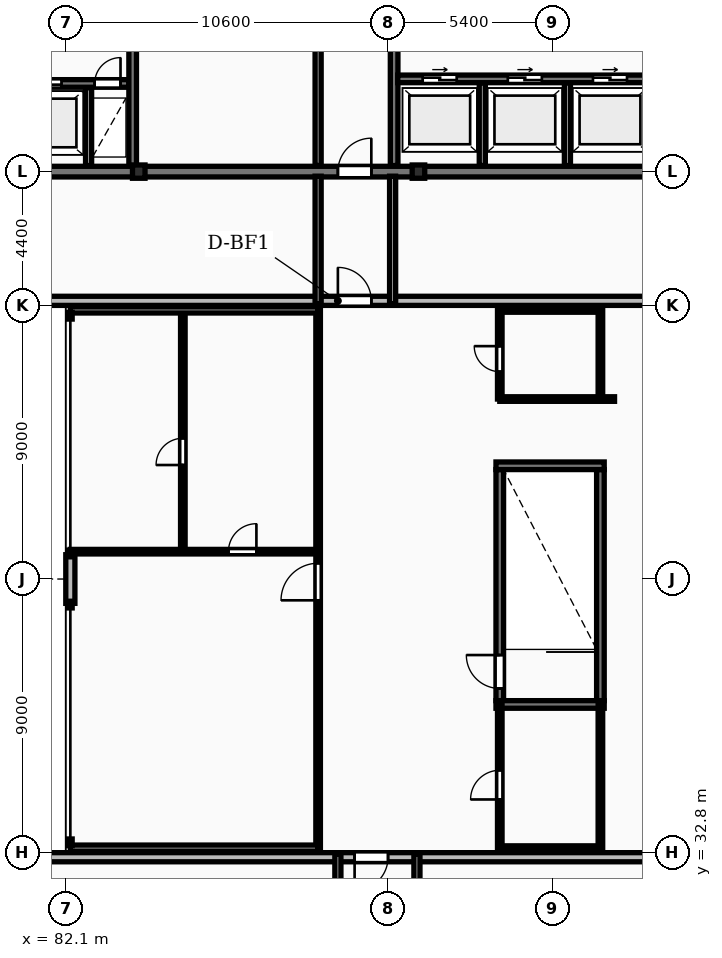
"""IFC4 building model, lengths in metres.
Left out: names, types, materials, properties, quantities, classifications, styles, units other than length and angle.
Written with IfcOpenShell. Run it as: python <this file> out.ifc"""

import sys

from ifc_helpers import new_model, si_unit, direction, frame, frame_2d, origin, origin_2d, place, context, subcontext, project, spatial, rectangle, i_section, extrude, element, fill, save


model = new_model("IFC4")
c1 = context("Model", 3, precision=1e-05, world=origin(), true_north=direction((0.0, 1.0)))
c2 = subcontext(c1, "Body", "Model", "MODEL_VIEW")
j1 = project(units=[si_unit("LENGTHUNIT", "METRE"), si_unit("PLANEANGLEUNIT", "RADIAN")], contexts=[c1])
p1 = place(None, origin())
s1 = spatial("IfcSite", under=j1, at=p1, CompositionType="ELEMENT")
p2 = place(p1, origin())
s2 = spatial("IfcBuilding", under=s1, at=p2, CompositionType="ELEMENT")
p3 = place(p2, frame((0.0, 0.0, 153.7)))
s3 = spatial("IfcBuildingStorey", under=s2, at=p3, CompositionType="ELEMENT", Elevation=153.7)
for number, where, z_axis, x_axis in (
    (1, (84.5, 55.2, 0.0), (0.0, 0.0, 1.0), (1.0, 0.0, 0.0)),
    (2, (93.7, 55.2, 0.0), (0.0, 0.0, 1.0), (1.0, 0.0, 0.0)),
):
    element("IfcColumn", number, at=place(p3, frame(where, z_axis=z_axis, x_axis=x_axis)), inside=s3, PredefinedType="COLUMN", context=c2, shape_type="SweptSolid", body=[
        extrude(i_section(OverallWidth=0.412, OverallDepth=0.437, WebThickness=0.036, FlangeThickness=0.052, FilletRadius=0.015, at=origin_2d()), origin(), (0.0, 0.0, 1.0), 3.6),
    ])
p4 = place(p3, frame((57.6, 50.95, 0.0), z_axis=(0.0, 0.0, 1.0), x_axis=(1.0, 0.0, 0.0)))
e3 = element("IfcWall", 3, at=p4, inside=s3, PredefinedType="STANDARD", context=c2, shape_type="SweptSolid", body=[
    extrude(rectangle(XDim=73.0, YDim=0.3, at=frame_2d((36.5, 0.0))), origin(), (0.0, 0.0, 1.0), 3.32),
])
p5 = place(p4, frame((15.225, 0.0, 0.85)))
e4 = element("IfcOpeningElement", 4, at=p5, cuts=e3, PredefinedType="OPENING", context=c2, shape_type="SweptSolid", body=[
    extrude(rectangle(XDim=1.8, YDim=1.8, at=frame_2d((0.9, 0.9))), frame((0.0, 0.16, 0.0), z_axis=(0.0, -1.0, 0.0), x_axis=(1.0, 0.0, 0.0)), (0.0, 0.0, 1.0), 0.32),
])
p6 = place(p4, frame((58.575, 0.0, 0.85)))
e5 = element("IfcOpeningElement", 5, at=p6, cuts=e3, PredefinedType="OPENING", context=c2, shape_type="SweptSolid", body=[
    extrude(rectangle(XDim=1.8, YDim=1.8, at=frame_2d((0.9, 0.9))), frame((0.0, 0.16, 0.0), z_axis=(0.0, -1.0, 0.0), x_axis=(1.0, 0.0, 0.0)), (0.0, 0.0, 1.0), 0.32),
])
p7 = place(p4, frame((33.45, 0.0, 0.0)))
e6 = element("IfcOpeningElement", 6, at=p7, cuts=e3, PredefinedType="OPENING", context=c2, shape_type="SweptSolid", body=[
    extrude(rectangle(XDim=1.1, YDim=2.1, at=frame_2d((0.55, 1.05))), frame((0.0, 0.16, 0.0), z_axis=(0.0, -1.0, 0.0), x_axis=(1.0, 0.0, 0.0)), (0.0, 0.0, 1.0), 0.32),
])
p8 = place(p3, frame((130.7, 32.65, 0.0), z_axis=(0.0, 0.0, 1.0), x_axis=(-1.0, 0.0, 0.0)))
e7 = element("IfcWall", 7, at=p8, inside=s3, PredefinedType="STANDARD", context=c2, shape_type="SweptSolid", body=[
    extrude(rectangle(XDim=58.0, YDim=0.3, at=frame_2d((29.0, 0.0))), origin(), (0.0, 0.0, 1.0), 3.32),
])
p9 = place(p8, frame((50.125, 0.0, 0.85)))
e8 = element("IfcOpeningElement", 8, at=p9, cuts=e7, PredefinedType="OPENING", context=c2, shape_type="SweptSolid", body=[
    extrude(rectangle(XDim=1.8, YDim=1.8, at=frame_2d((0.9, 0.9))), frame((0.0, 0.16, 0.0), z_axis=(0.0, -1.0, 0.0), x_axis=(1.0, 0.0, 0.0)), (0.0, 0.0, 1.0), 0.32),
])
p10 = place(p8, frame((6.775, 0.0, 0.85)))
e9 = element("IfcOpeningElement", 9, at=p10, cuts=e7, PredefinedType="OPENING", context=c2, shape_type="SweptSolid", body=[
    extrude(rectangle(XDim=1.8, YDim=1.8, at=frame_2d((0.9, 0.9))), frame((0.0, 0.16, 0.0), z_axis=(0.0, -1.0, 0.0), x_axis=(1.0, 0.0, 0.0)), (0.0, 0.0, 1.0), 0.32),
])
p11 = place(p8, frame((38.0, 0.0, 0.0)))
e10 = element("IfcOpeningElement", 10, at=p11, cuts=e7, PredefinedType="OPENING", context=c2, shape_type="SweptSolid", body=[
    extrude(rectangle(XDim=1.1, YDim=2.1, at=frame_2d((0.55, 1.05))), frame((0.0, 0.16, 0.0), z_axis=(0.0, -1.0, 0.0), x_axis=(1.0, 0.0, 0.0)), (0.0, 0.0, 1.0), 0.32),
])
p12 = place(p3, frame((82.25, 41.0, 0.0), z_axis=(0.0, 0.0, 1.0), x_axis=(0.0, 1.0, 0.0)))
e11 = element("IfcWall", 11, at=p12, inside=s3, PredefinedType="STANDARD", context=c2, shape_type="SweptSolid", body=[
    extrude(rectangle(XDim=1.6, YDim=0.3, at=frame_2d((0.8, 0.0))), origin(), (0.0, 0.0, 1.0), 2.39),
])
p13 = place(p3, frame((75.95, 55.2, 0.0), z_axis=(0.0, 0.0, 1.0), x_axis=(1.0, 0.0, 0.0)))
e12 = element("IfcWall", 12, at=p13, inside=s3, PredefinedType="SHEAR", context=c2, shape_type="SweptSolid", body=[
    extrude(rectangle(XDim=36.3, YDim=0.35, at=frame_2d((18.15, 0.0))), origin(), (0.0, 0.0, 1.0), 3.6),
])
p14 = place(p13, frame((15.1, 0.0, 0.0)))
e13 = element("IfcOpeningElement", 13, at=p14, cuts=e12, PredefinedType="OPENING", context=c2, shape_type="SweptSolid", body=[
    extrude(rectangle(XDim=1.1, YDim=2.1, at=frame_2d((0.55, 1.05))), frame((0.0, 0.185, 0.0), z_axis=(0.0, -1.0, 0.0), x_axis=(1.0, 0.0, 0.0)), (0.0, 0.0, 1.0), 0.37),
])
p15 = place(p3, frame((79.79, 58.1, 0.0), z_axis=(0.0, 0.0, 1.0), x_axis=(1.0, 0.0, 0.0)))
e14 = element("IfcWall", 14, at=p15, inside=s3, PredefinedType="SHEAR", context=c2, shape_type="SweptSolid", body=[
    extrude(rectangle(XDim=4.39, YDim=0.25, at=frame_2d((2.195, 0.0))), origin(), (0.0, 0.0, 1.0), 3.6),
])
p16 = place(p15, frame((1.05, 0.0, 0.0)))
e15 = element("IfcOpeningElement", 15, at=p16, cuts=e14, PredefinedType="OPENING", context=c2, shape_type="SweptSolid", body=[
    extrude(rectangle(XDim=1.12, YDim=2.12, at=frame_2d((0.56, 1.06))), frame((0.0, 0.135, 0.0), z_axis=(0.0, -1.0, 0.0), x_axis=(1.0, 0.0, 0.0)), (0.0, 0.0, 1.0), 0.27),
])
p17 = place(p15, frame((3.26, 0.0, 0.0)))
e16 = element("IfcOpeningElement", 16, at=p17, cuts=e14, PredefinedType="OPENING", context=c2, shape_type="SweptSolid", body=[
    extrude(rectangle(XDim=0.85, YDim=2.05, at=frame_2d((0.425, 1.025))), frame((0.0, 0.135, 0.0), z_axis=(0.0, -1.0, 0.0), x_axis=(1.0, 0.0, 0.0)), (0.0, 0.0, 1.0), 0.27),
])
p18 = place(p3, frame((82.85, 55.4, 0.0), z_axis=(0.0, 0.0, 1.0), x_axis=(0.0, 1.0, 0.0)))
e17 = element("IfcWall", 17, at=p18, inside=s3, PredefinedType="PARTITIONING", context=c2, shape_type="SweptSolid", body=[
    extrude(rectangle(XDim=2.56, YDim=0.2, at=frame_2d((1.28, 0.0))), origin(), (0.0, 0.0, 1.0), 3.32),
])
p19 = place(p3, frame((84.3, 55.4, 0.0), z_axis=(0.0, 0.0, 1.0), x_axis=(0.0, 1.0, 0.0)))
e18 = element("IfcWall", 18, at=p19, inside=s3, PredefinedType="SHEAR", context=c2, shape_type="SweptSolid", body=[
    extrude(rectangle(XDim=11.6, YDim=0.25, at=frame_2d((5.8, 0.0))), origin(), (0.0, 0.0, 1.0), 3.6),
])
p20 = place(p19, frame((5.2, 0.0, 0.0)))
e19 = element("IfcOpeningElement", 19, at=p20, cuts=e18, PredefinedType="OPENING", context=c2, shape_type="SweptSolid", body=[
    extrude(rectangle(XDim=1.1, YDim=2.1, at=frame_2d((0.55, 1.05))), frame((0.0, 0.135, 0.0), z_axis=(0.0, -1.0, 0.0), x_axis=(1.0, 0.0, 0.0)), (0.0, 0.0, 1.0), 0.27),
])
p21 = place(p3, frame((90.4, 55.4, 0.0), z_axis=(0.0, 0.0, 1.0), x_axis=(0.0, 1.0, 0.0)))
e20 = element("IfcWall", 20, at=p21, inside=s3, PredefinedType="PARTITIONING", context=c2, shape_type="SweptSolid", body=[
    extrude(rectangle(XDim=4.1, YDim=0.2, at=frame_2d((2.05, 0.0))), origin(), (0.0, 0.0, 1.0), 3.32),
])
p22 = place(p3, frame((92.9, 55.4, 0.0), z_axis=(0.0, 0.0, 1.0), x_axis=(0.0, 1.0, 0.0)))
e21 = element("IfcWall", 21, at=p22, inside=s3, PredefinedType="SHEAR", context=c2, shape_type="SweptSolid", body=[
    extrude(rectangle(XDim=4.1, YDim=0.25, at=frame_2d((2.05, 0.0))), origin(), (0.0, 0.0, 1.0), 3.6),
])
for number, where, z_axis, x_axis in (
    (22, (95.8, 55.4, 0.0), (0.0, 0.0, 1.0), (0.0, 1.0, 0.0)),
    (23, (98.6, 55.4, 0.0), (0.0, 0.0, 1.0), (0.0, 1.0, 0.0)),
):
    element("IfcWall", number, at=place(p3, frame(where, z_axis=z_axis, x_axis=x_axis)), inside=s3, PredefinedType="PARTITIONING", context=c2, shape_type="SweptSolid", body=[
        extrude(rectangle(XDim=2.72, YDim=0.2, at=frame_2d((1.36, 0.0))), origin(), (0.0, 0.0, 1.0), 3.32),
    ])
p23 = place(p3, frame((93.02, 58.25, 0.0), z_axis=(0.0, 0.0, 1.0), x_axis=(1.0, 0.0, 0.0)))
e24 = element("IfcWall", 24, at=p23, inside=s3, PredefinedType="SHEAR", context=c2, shape_type="SweptSolid", body=[
    extrude(rectangle(XDim=8.36, YDim=0.25, at=frame_2d((4.18, 0.0))), origin(), (0.0, 0.0, 1.0), 3.6),
])
p24 = place(p23, frame((0.82, 0.0, 0.0)))
e25 = element("IfcOpeningElement", 25, at=p24, cuts=e24, PredefinedType="OPENING", context=c2, shape_type="SweptSolid", body=[
    extrude(rectangle(XDim=1.12, YDim=2.12, at=frame_2d((0.56, 1.06))), frame((0.0, 0.135, 0.0), z_axis=(0.0, -1.0, 0.0), x_axis=(1.0, 0.0, 0.0)), (0.0, 0.0, 1.0), 0.27),
])
p25 = place(p23, frame((3.62, 0.0, 0.0)))
e26 = element("IfcOpeningElement", 26, at=p25, cuts=e24, PredefinedType="OPENING", context=c2, shape_type="SweptSolid", body=[
    extrude(rectangle(XDim=1.12, YDim=2.12, at=frame_2d((0.56, 1.06))), frame((0.0, 0.135, 0.0), z_axis=(0.0, -1.0, 0.0), x_axis=(1.0, 0.0, 0.0)), (0.0, 0.0, 1.0), 0.27),
])
p26 = place(p23, frame((6.42, 0.0, 0.0)))
e27 = element("IfcOpeningElement", 27, at=p26, cuts=e24, PredefinedType="OPENING", context=c2, shape_type="SweptSolid", body=[
    extrude(rectangle(XDim=1.12, YDim=2.12, at=frame_2d((0.56, 1.06))), frame((0.0, 0.135, 0.0), z_axis=(0.0, -1.0, 0.0), x_axis=(1.0, 0.0, 0.0)), (0.0, 0.0, 1.0), 0.27),
])
for number, where, z_axis, x_axis in (
    (28, (90.4, 50.85, 0.0), (0.0, 0.0, 1.0), (0.0, 1.0, 0.0)),
    (29, (92.85, 50.85, 0.0), (0.0, 0.0, 1.0), (0.0, 1.0, 0.0)),
):
    element("IfcWall", number, at=place(p3, frame(where, z_axis=z_axis, x_axis=x_axis)), inside=s3, PredefinedType="PARTITIONING", context=c2, shape_type="SweptSolid", body=[
        extrude(rectangle(XDim=4.2, YDim=0.2, at=frame_2d((2.1, 0.0))), origin(), (0.0, 0.0, 1.0), 3.32),
    ])
p27 = place(p3, frame((91.05, 30.55, 0.0), z_axis=(0.0, 0.0, 1.0), x_axis=(0.0, 1.0, 0.0)))
e30 = element("IfcWall", 30, at=p27, inside=s3, PredefinedType="PARTITIONING", context=c2, shape_type="SweptSolid", body=[
    extrude(rectangle(XDim=2.2, YDim=0.2, at=frame_2d((1.1, 0.0))), origin(), (0.0, 0.0, 1.0), 3.32),
])
p28 = place(p3, frame((93.65, 30.55, 0.0), z_axis=(0.0, 0.0, 1.0), x_axis=(0.0, 1.0, 0.0)))
e31 = element("IfcWall", 31, at=p28, inside=s3, PredefinedType="PARTITIONING", context=c2, shape_type="SweptSolid", body=[
    extrude(rectangle(XDim=2.2, YDim=0.2, at=frame_2d((1.1, 0.0))), origin(), (0.0, 0.0, 1.0), 2.394),
])
p29 = place(p3, frame((96.375, 37.8, 0.0), z_axis=(0.0, 0.0, 1.0), x_axis=(0.0, 1.0, 0.0)))
e32 = element("IfcWall", 32, at=p29, inside=s3, PredefinedType="SHEAR", context=c2, shape_type="SweptSolid", body=[
    extrude(rectangle(XDim=7.6, YDim=0.25, at=frame_2d((3.8, 0.0))), origin(), (0.0, 0.0, 1.0), 3.6),
])
p30 = place(p29, frame((0.4, 0.0, 0.0)))
e33 = element("IfcOpeningElement", 33, at=p30, cuts=e32, PredefinedType="OPENING", context=c2, shape_type="SweptSolid", body=[
    extrude(rectangle(XDim=1.1, YDim=2.1, at=frame_2d((0.55, 1.05))), frame((0.0, 0.135, 0.0), z_axis=(0.0, -1.0, 0.0), x_axis=(1.0, 0.0, 0.0)), (0.0, 0.0, 1.0), 0.27),
])
p31 = place(p3, frame((99.685, 37.8, 0.0), z_axis=(0.0, 0.0, 1.0), x_axis=(0.0, 1.0, 0.0)))
e34 = element("IfcWall", 34, at=p31, inside=s3, PredefinedType="SHEAR", context=c2, shape_type="SweptSolid", body=[
    extrude(rectangle(XDim=7.6, YDim=0.25, at=frame_2d((3.8, 0.0))), origin(), (0.0, 0.0, 1.0), 3.6),
])
for number, where, z_axis, x_axis in (
    (35, (96.25, 37.675, 0.0), (0.0, 0.0, 1.0), (1.0, 0.0, 0.0)),
    (36, (96.25, 45.525, 0.0), (0.0, 0.0, 1.0), (1.0, 0.0, 0.0)),
):
    element("IfcWall", number, at=place(p3, frame(where, z_axis=z_axis, x_axis=x_axis)), inside=s3, PredefinedType="SHEAR", context=c2, shape_type="SweptSolid", body=[
        extrude(rectangle(XDim=3.56, YDim=0.25, at=frame_2d((1.78, 0.0))), origin(), (0.0, 0.0, 1.0), 3.6),
    ])
for number, where, z_axis, x_axis in (
    (37, (96.375, 32.95, 0.0), (0.0, 0.0, 1.0), (1.0, 0.0, 0.0)),
    (38, (96.375, 50.65, 0.0), (0.0, 0.0, 1.0), (1.0, 0.0, 0.0)),
):
    element("IfcWall", number, at=place(p3, frame(where, z_axis=z_axis, x_axis=x_axis)), inside=s3, PredefinedType="PARTITIONING", context=c2, shape_type="SweptSolid", body=[
        extrude(rectangle(XDim=3.31, YDim=0.15, at=frame_2d((1.655, 0.0))), origin(), (0.0, 0.0, 1.0), 2.7),
    ])
p32 = place(p3, frame((96.375, 32.95, 0.0), z_axis=(0.0, 0.0, 1.0), x_axis=(0.0, 1.0, 0.0)))
e39 = element("IfcWall", 39, at=p32, inside=s3, PredefinedType="PARTITIONING", context=c2, shape_type="SweptSolid", body=[
    extrude(rectangle(XDim=4.725, YDim=0.15, at=frame_2d((2.363, 0.0))), origin(), (0.0, 0.0, 1.0), 2.394),
])
p33 = place(p32, frame((1.6, 0.0, 0.0)))
e40 = element("IfcOpeningElement", 40, at=p33, cuts=e39, PredefinedType="OPENING", context=c2, shape_type="SweptSolid", body=[
    extrude(rectangle(XDim=0.96, YDim=2.1, at=frame_2d((0.48, 1.05))), frame((0.0, 0.085, 0.0), z_axis=(0.0, -1.0, 0.0), x_axis=(1.0, 0.0, 0.0)), (0.0, 0.0, 1.0), 0.17),
])
p34 = place(p3, frame((96.375, 47.72, 0.0), z_axis=(0.0, 0.0, 1.0), x_axis=(0.0, 1.0, 0.0)))
e41 = element("IfcWall", 41, at=p34, inside=s3, PredefinedType="PARTITIONING", context=c2, shape_type="SweptSolid", body=[
    extrude(rectangle(XDim=2.93, YDim=0.15, at=frame_2d((1.465, 0.0))), origin(), (0.0, 0.0, 1.0), 2.394),
])
p35 = place(p34, frame((0.9, 0.0, 0.0)))
e42 = element("IfcOpeningElement", 42, at=p35, cuts=e41, PredefinedType="OPENING", context=c2, shape_type="SweptSolid", body=[
    extrude(rectangle(XDim=0.84, YDim=2.04, at=frame_2d((0.42, 1.02))), frame((0.0, 0.085, 0.0), z_axis=(0.0, -1.0, 0.0), x_axis=(1.0, 0.0, 0.0)), (0.0, 0.0, 1.0), 0.17),
])
p36 = place(p3, frame((96.375, 47.72, 0.0), z_axis=(0.0, 0.0, 1.0), x_axis=(1.0, 0.0, 0.0)))
e43 = element("IfcWall", 43, at=p36, inside=s3, PredefinedType="PARTITIONING", context=c2, shape_type="SweptSolid", body=[
    extrude(rectangle(XDim=3.775, YDim=0.15, at=frame_2d((1.887, 0.0))), origin(), (0.0, 0.0, 1.0), 3.32),
])
p37 = place(p3, frame((99.685, 32.95, 0.0), z_axis=(0.0, 0.0, 1.0), x_axis=(0.0, 1.0, 0.0)))
e44 = element("IfcWall", 44, at=p37, inside=s3, PredefinedType="PARTITIONING", context=c2, shape_type="SweptSolid", body=[
    extrude(rectangle(XDim=4.725, YDim=0.15, at=frame_2d((2.363, 0.0))), origin(), (0.0, 0.0, 1.0), 2.394),
])
p38 = place(p3, frame((99.685, 47.72, 0.0), z_axis=(0.0, 0.0, 1.0), x_axis=(0.0, 1.0, 0.0)))
e45 = element("IfcWall", 45, at=p38, inside=s3, PredefinedType="PARTITIONING", context=c2, shape_type="SweptSolid", body=[
    extrude(rectangle(XDim=2.93, YDim=0.15, at=frame_2d((1.465, 0.0))), origin(), (0.0, 0.0, 1.0), 2.394),
])
p39 = place(p3, frame((90.4, 32.9, 0.0), z_axis=(0.0, 0.0, 1.0), x_axis=(0.0, 1.0, 0.0)))
e46 = element("IfcWall", 46, at=p39, inside=s3, PredefinedType="PARTITIONING", context=c2, shape_type="SweptSolid", body=[
    extrude(rectangle(XDim=17.8, YDim=0.15, at=frame_2d((8.9, 0.0))), origin(), (0.0, 0.0, 1.0), 3.32),
])
p40 = place(p39, frame((8.2, 0.0, 0.0)))
e47 = element("IfcOpeningElement", 47, at=p40, cuts=e46, PredefinedType="OPENING", context=c2, shape_type="SweptSolid", body=[
    extrude(rectangle(XDim=1.22, YDim=2.18, at=frame_2d((0.61, 1.09))), frame((0.0, 0.085, 0.0), z_axis=(0.0, -1.0, 0.0), x_axis=(1.0, 0.0, 0.0)), (0.0, 0.0, 1.0), 0.17),
])
p41 = place(p3, frame((82.25, 42.7, 0.0), z_axis=(0.0, 0.0, 1.0), x_axis=(1.0, 0.0, 0.0)))
e48 = element("IfcWall", 48, at=p41, inside=s3, PredefinedType="PARTITIONING", context=c2, shape_type="SweptSolid", body=[
    extrude(rectangle(XDim=8.1, YDim=0.15, at=frame_2d((4.05, 0.0))), origin(), (0.0, 0.0, 1.0), 3.32),
])
p42 = place(p41, frame((5.2, 0.0, 0.0)))
e49 = element("IfcOpeningElement", 49, at=p42, cuts=e48, PredefinedType="OPENING", context=c2, shape_type="SweptSolid", body=[
    extrude(rectangle(XDim=0.92, YDim=2.08, at=frame_2d((0.46, 1.04))), frame((0.0, 0.085, 0.0), z_axis=(0.0, -1.0, 0.0), x_axis=(1.0, 0.0, 0.0)), (0.0, 0.0, 1.0), 0.17),
])
p43 = place(p3, frame((85.95, 42.75, 0.0), z_axis=(0.0, 0.0, 1.0), x_axis=(0.0, 1.0, 0.0)))
e50 = element("IfcWall", 50, at=p43, inside=s3, PredefinedType="PARTITIONING", context=c2, shape_type="SweptSolid", body=[
    extrude(rectangle(XDim=7.9, YDim=0.15, at=frame_2d((3.95, 0.0))), origin(), (0.0, 0.0, 1.0), 3.32),
])
p44 = place(p43, frame((2.8, 0.0, 0.0)))
e51 = element("IfcOpeningElement", 51, at=p44, cuts=e50, PredefinedType="OPENING", context=c2, shape_type="SweptSolid", body=[
    extrude(rectangle(XDim=0.88, YDim=2.06, at=frame_2d((0.44, 1.03))), frame((0.0, 0.085, 0.0), z_axis=(0.0, -1.0, 0.0), x_axis=(1.0, 0.0, 0.0)), (0.0, 0.0, 1.0), 0.17),
])
for number, where, z_axis, x_axis in (
    (52, (82.25, 50.65, 0.0), (0.0, 0.0, 1.0), (1.0, 0.0, 0.0)),
    (53, (82.25, 32.95, 0.0), (0.0, 0.0, 1.0), (1.0, 0.0, 0.0)),
):
    element("IfcWall", number, at=place(p3, frame(where, z_axis=z_axis, x_axis=x_axis)), inside=s3, PredefinedType="PARTITIONING", context=c2, shape_type="SweptSolid", body=[
        extrude(rectangle(XDim=8.15, YDim=0.2, at=frame_2d((4.075, 0.0))), origin(), (0.0, 0.0, 1.0), 2.7),
    ])
p45 = place(p7, origin())
e54 = element("IfcDoor", 54, at=p45, inside=s3, OperationType="SINGLE_SWING_LEFT", PredefinedType="DOOR", context=c2, shape_type="SweptSolid", body=[
    extrude(rectangle(XDim=1.1, YDim=2.1, at=frame_2d((0.55, 1.05))), frame((0.0, 0.025, 0.0), z_axis=(0.0, -1.0, 0.0), x_axis=(1.0, 0.0, 0.0)), (0.0, 0.0, 1.0), 0.05),
])
fill(e6, e54)
p46 = place(p11, origin())
e55 = element("IfcDoor", 55, at=p46, inside=s3, OperationType="SINGLE_SWING_RIGHT", PredefinedType="DOOR", context=c2, shape_type="SweptSolid", body=[
    extrude(rectangle(XDim=1.1, YDim=2.1, at=frame_2d((0.55, 1.05))), frame((0.0, 0.025, 0.0), z_axis=(0.0, -1.0, 0.0), x_axis=(1.0, 0.0, 0.0)), (0.0, 0.0, 1.0), 0.05),
])
fill(e10, e55)
p47 = place(p14, origin())
e56 = element("IfcDoor", 56, at=p47, inside=s3, OperationType="SINGLE_SWING_RIGHT", PredefinedType="DOOR", context=c2, shape_type="SweptSolid", body=[
    extrude(rectangle(XDim=1.1, YDim=2.1, at=frame_2d((0.55, 1.05))), frame((0.0, 0.025, 0.0), z_axis=(0.0, -1.0, 0.0), x_axis=(1.0, 0.0, 0.0)), (0.0, 0.0, 1.0), 0.05),
])
fill(e13, e56)
p48 = place(p16, origin())
e57 = element("IfcDoor", 57, at=p48, inside=s3, OperationType="SLIDING_TO_LEFT", PredefinedType="DOOR", context=c2, shape_type="SweptSolid", body=[
    extrude(rectangle(XDim=1.12, YDim=2.12, at=frame_2d((0.56, 1.06))), frame((0.0, 0.025, 0.0), z_axis=(0.0, -1.0, 0.0), x_axis=(1.0, 0.0, 0.0)), (0.0, 0.0, 1.0), 0.05),
])
fill(e15, e57)
p49 = place(p17, origin())
e58 = element("IfcDoor", 58, at=p49, inside=s3, OperationType="SINGLE_SWING_RIGHT", PredefinedType="DOOR", context=c2, shape_type="SweptSolid", body=[
    extrude(rectangle(XDim=0.85, YDim=2.05, at=frame_2d((0.425, 1.025))), frame((0.0, 0.025, 0.0), z_axis=(0.0, -1.0, 0.0), x_axis=(1.0, 0.0, 0.0)), (0.0, 0.0, 1.0), 0.05),
])
fill(e16, e58)
p50 = place(p24, origin())
e59 = element("IfcDoor", 59, at=p50, inside=s3, OperationType="SLIDING_TO_RIGHT", PredefinedType="DOOR", context=c2, shape_type="SweptSolid", body=[
    extrude(rectangle(XDim=1.12, YDim=2.12, at=frame_2d((0.56, 1.06))), frame((0.0, 0.025, 0.0), z_axis=(0.0, -1.0, 0.0), x_axis=(1.0, 0.0, 0.0)), (0.0, 0.0, 1.0), 0.05),
])
fill(e25, e59)
p51 = place(p25, origin())
e60 = element("IfcDoor", 60, at=p51, inside=s3, OperationType="SLIDING_TO_RIGHT", PredefinedType="DOOR", context=c2, shape_type="SweptSolid", body=[
    extrude(rectangle(XDim=1.12, YDim=2.12, at=frame_2d((0.56, 1.06))), frame((0.0, 0.025, 0.0), z_axis=(0.0, -1.0, 0.0), x_axis=(1.0, 0.0, 0.0)), (0.0, 0.0, 1.0), 0.05),
])
fill(e26, e60)
p52 = place(p26, origin())
e61 = element("IfcDoor", 61, at=p52, inside=s3, OperationType="SLIDING_TO_RIGHT", PredefinedType="DOOR", context=c2, shape_type="SweptSolid", body=[
    extrude(rectangle(XDim=1.12, YDim=2.12, at=frame_2d((0.56, 1.06))), frame((0.0, 0.025, 0.0), z_axis=(0.0, -1.0, 0.0), x_axis=(1.0, 0.0, 0.0)), (0.0, 0.0, 1.0), 0.05),
])
fill(e27, e61)
p53 = place(p30, origin())
e62 = element("IfcDoor", 62, at=p53, inside=s3, OperationType="SINGLE_SWING_RIGHT", PredefinedType="DOOR", context=c2, shape_type="SweptSolid", body=[
    extrude(rectangle(XDim=1.1, YDim=2.1, at=frame_2d((0.55, 1.05))), frame((0.0, 0.025, 0.0), z_axis=(0.0, -1.0, 0.0), x_axis=(1.0, 0.0, 0.0)), (0.0, 0.0, 1.0), 0.05),
])
fill(e33, e62)
p54 = place(p33, origin())
e63 = element("IfcDoor", 63, at=p54, inside=s3, OperationType="SINGLE_SWING_LEFT", PredefinedType="DOOR", context=c2, shape_type="SweptSolid", body=[
    extrude(rectangle(XDim=0.96, YDim=2.1, at=frame_2d((0.48, 1.05))), frame((0.0, 0.025, 0.0), z_axis=(0.0, -1.0, 0.0), x_axis=(1.0, 0.0, 0.0)), (0.0, 0.0, 1.0), 0.05),
])
fill(e40, e63)
p55 = place(p35, origin())
e64 = element("IfcDoor", 64, at=p55, inside=s3, OperationType="SINGLE_SWING_RIGHT", PredefinedType="DOOR", context=c2, shape_type="SweptSolid", body=[
    extrude(rectangle(XDim=0.84, YDim=2.04, at=frame_2d((0.42, 1.02))), frame((0.0, 0.025, 0.0), z_axis=(0.0, -1.0, 0.0), x_axis=(1.0, 0.0, 0.0)), (0.0, 0.0, 1.0), 0.05),
])
fill(e42, e64)
p56 = place(p40, origin())
e65 = element("IfcDoor", 65, at=p56, inside=s3, OperationType="SINGLE_SWING_LEFT", PredefinedType="DOOR", context=c2, shape_type="SweptSolid", body=[
    extrude(rectangle(XDim=1.22, YDim=2.18, at=frame_2d((0.61, 1.09))), frame((0.0, 0.025, 0.0), z_axis=(0.0, -1.0, 0.0), x_axis=(1.0, 0.0, 0.0)), (0.0, 0.0, 1.0), 0.05),
])
fill(e47, e65)
p57 = place(p42, origin())
e66 = element("IfcDoor", 66, at=p57, inside=s3, OperationType="SINGLE_SWING_RIGHT", PredefinedType="DOOR", context=c2, shape_type="SweptSolid", body=[
    extrude(rectangle(XDim=0.92, YDim=2.08, at=frame_2d((0.46, 1.04))), frame((0.0, 0.025, 0.0), z_axis=(0.0, -1.0, 0.0), x_axis=(1.0, 0.0, 0.0)), (0.0, 0.0, 1.0), 0.05),
])
fill(e49, e66)
p58 = place(p44, origin())
e67 = element("IfcDoor", 67, at=p58, inside=s3, OperationType="SINGLE_SWING_LEFT", PredefinedType="DOOR", context=c2, shape_type="SweptSolid", body=[
    extrude(rectangle(XDim=0.88, YDim=2.06, at=frame_2d((0.44, 1.03))), frame((0.0, 0.025, 0.0), z_axis=(0.0, -1.0, 0.0), x_axis=(1.0, 0.0, 0.0)), (0.0, 0.0, 1.0), 0.05),
])
fill(e51, e67)
save(model, sys.argv[1])
